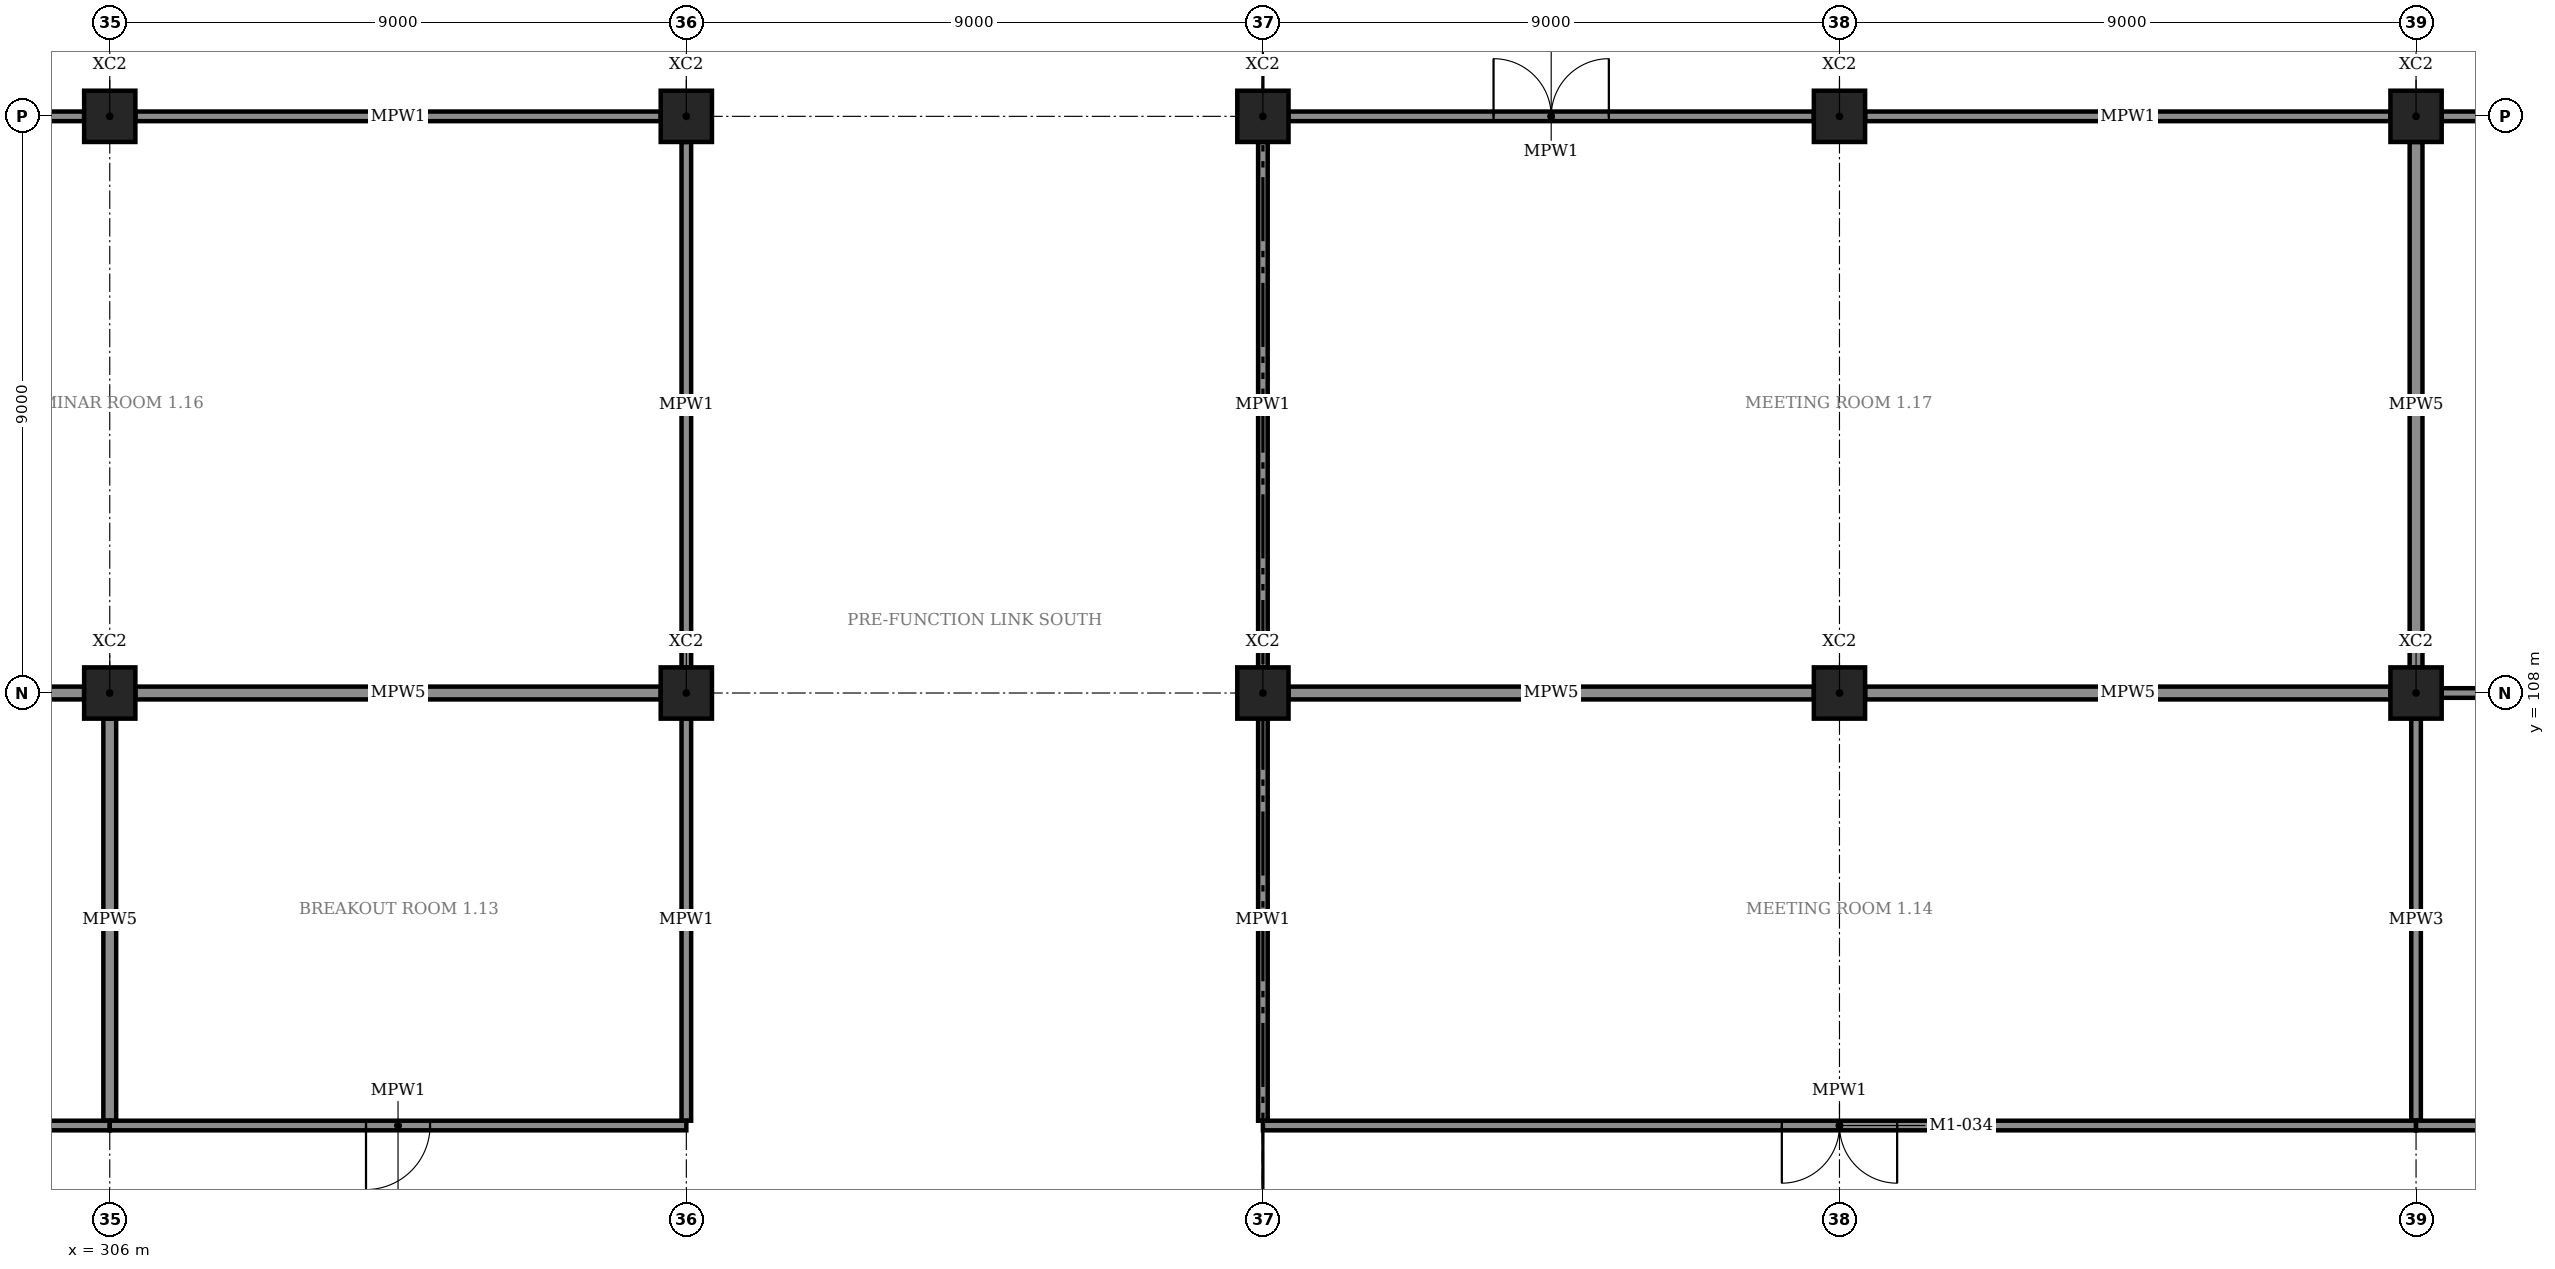
"""IFC4 building model, lengths in metres.
Left out: names, types, materials, properties, quantities, classifications, styles, units other than length and angle.
Written with IfcOpenShell. Run it as: python <this file> out.ifc"""

import sys

from ifc_helpers import new_model, si_unit, direction, frame, frame_2d, origin, origin_2d, place, context, subcontext, project, spatial, rectangle, extrude, element, fill, save


model = new_model("IFC4")
c1 = context("Model", 3, precision=1e-05, world=origin(), true_north=direction((0.0, 1.0)))
c2 = subcontext(c1, "Body", "Model", "MODEL_VIEW")
j1 = project(units=[si_unit("LENGTHUNIT", "METRE"), si_unit("PLANEANGLEUNIT", "RADIAN")], contexts=[c1])
p1 = place(None, origin())
s1 = spatial("IfcSite", under=j1, at=p1, CompositionType="ELEMENT")
p2 = place(p1, origin())
s2 = spatial("IfcBuilding", under=s1, at=p2, CompositionType="ELEMENT")
p3 = place(p2, frame((0.0, 0.0, 6.0)))
s3 = spatial("IfcBuildingStorey", under=s2, at=p3, CompositionType="ELEMENT", Elevation=6.0)
for number, where, z_axis, x_axis in (
    (1, (306.0, 108.0, 0.0), (0.0, 0.0, 1.0), (1.0, 0.0, 0.0)),
    (2, (306.0, 117.0, 0.0), (0.0, 0.0, 1.0), (1.0, 0.0, 0.0)),
    (3, (315.0, 108.0, 0.0), (0.0, 0.0, 1.0), (1.0, 0.0, 0.0)),
    (4, (315.0, 117.0, 0.0), (0.0, 0.0, 1.0), (1.0, 0.0, 0.0)),
    (5, (324.0, 108.0, 0.0), (0.0, 0.0, 1.0), (1.0, 0.0, 0.0)),
    (6, (324.0, 117.0, 0.0), (0.0, 0.0, 1.0), (1.0, 0.0, 0.0)),
    (7, (333.0, 108.0, 0.0), (0.0, 0.0, 1.0), (1.0, 0.0, 0.0)),
    (8, (333.0, 117.0, 0.0), (0.0, 0.0, 1.0), (1.0, 0.0, 0.0)),
    (9, (342.0, 108.0, 0.0), (0.0, 0.0, 1.0), (1.0, 0.0, 0.0)),
    (10, (342.0, 117.0, 0.0), (0.0, 0.0, 1.0), (1.0, 0.0, 0.0)),
):
    element("IfcColumn", number, at=place(p3, frame(where, z_axis=z_axis, x_axis=x_axis)), inside=s3, PredefinedType="COLUMN", context=c2, shape_type="SweptSolid", body=[
        extrude(rectangle(XDim=0.8, YDim=0.8, at=origin_2d()), origin(), (0.0, 0.0, 1.0), 5.5),
    ])
p4 = place(p3, frame((297.0, 101.25, 0.0), z_axis=(0.0, 0.0, 1.0), x_axis=(1.0, 0.0, 0.0)))
e11 = element("IfcWall", 11, at=p4, inside=s3, PredefinedType="PARTITIONING", context=c2, shape_type="SweptSolid", body=[
    extrude(rectangle(XDim=9.0, YDim=0.15, at=frame_2d((4.5, 0.0))), origin(), (0.0, 0.0, 1.0), 4.32),
])
p5 = place(p4, frame((4.0, 0.0, 0.0)))
e12 = element("IfcOpeningElement", 12, at=p5, cuts=e11, PredefinedType="OPENING", context=c2, shape_type="SweptSolid", body=[
    extrude(rectangle(XDim=1.0, YDim=2.4, at=frame_2d((0.5, 1.2))), frame((0.0, 0.085, 0.0), z_axis=(0.0, -1.0, 0.0), x_axis=(1.0, 0.0, 0.0)), (0.0, 0.0, 1.0), 0.17),
])
p6 = place(p3, frame((297.4, 108.0, 0.0), z_axis=(0.0, 0.0, 1.0), x_axis=(1.0, 0.0, 0.0)))
e13 = element("IfcWall", 13, at=p6, inside=s3, PredefinedType="PARTITIONING", context=c2, shape_type="SweptSolid", body=[
    extrude(rectangle(XDim=8.2, YDim=0.2, at=frame_2d((4.1, 0.0))), origin(), (0.0, 0.0, 1.0), 4.32),
])
p7 = place(p3, frame((306.0, 101.325, 0.0), z_axis=(0.0, 0.0, 1.0), x_axis=(0.0, 1.0, 0.0)))
e14 = element("IfcWall", 14, at=p7, inside=s3, PredefinedType="PARTITIONING", context=c2, shape_type="SweptSolid", body=[
    extrude(rectangle(XDim=6.275, YDim=0.2, at=frame_2d((3.138, 0.0))), origin(), (0.0, 0.0, 1.0), 4.32),
])
p8 = place(p3, frame((306.0, 101.25, 0.0), z_axis=(0.0, 0.0, 1.0), x_axis=(1.0, 0.0, 0.0)))
e15 = element("IfcWall", 15, at=p8, inside=s3, PredefinedType="PARTITIONING", context=c2, shape_type="SweptSolid", body=[
    extrude(rectangle(XDim=9.0, YDim=0.15, at=frame_2d((4.5, 0.0))), origin(), (0.0, 0.0, 1.0), 4.32),
])
p9 = place(p8, frame((4.0, 0.0, 0.0)))
e16 = element("IfcOpeningElement", 16, at=p9, cuts=e15, PredefinedType="OPENING", context=c2, shape_type="SweptSolid", body=[
    extrude(rectangle(XDim=1.0, YDim=2.4, at=frame_2d((0.5, 1.2))), frame((0.0, 0.085, 0.0), z_axis=(0.0, -1.0, 0.0), x_axis=(1.0, 0.0, 0.0)), (0.0, 0.0, 1.0), 0.17),
])
p10 = place(p3, frame((306.4, 108.0, 0.0), z_axis=(0.0, 0.0, 1.0), x_axis=(1.0, 0.0, 0.0)))
e17 = element("IfcWall", 17, at=p10, inside=s3, PredefinedType="PARTITIONING", context=c2, shape_type="SweptSolid", body=[
    extrude(rectangle(XDim=8.2, YDim=0.2, at=frame_2d((4.1, 0.0))), origin(), (0.0, 0.0, 1.0), 4.32),
])
p11 = place(p3, frame((315.0, 101.325, 0.0), z_axis=(0.0, 0.0, 1.0), x_axis=(0.0, 1.0, 0.0)))
e18 = element("IfcWall", 18, at=p11, inside=s3, PredefinedType="PARTITIONING", context=c2, shape_type="SweptSolid", body=[
    extrude(rectangle(XDim=6.275, YDim=0.15, at=frame_2d((3.138, 0.0))), origin(), (0.0, 0.0, 1.0), 4.32),
])
p12 = place(p3, frame((324.0, 101.25, 0.0), z_axis=(0.0, 0.0, 1.0), x_axis=(1.0, 0.0, 0.0)))
e19 = element("IfcWall", 19, at=p12, inside=s3, PredefinedType="PARTITIONING", context=c2, shape_type="SweptSolid", body=[
    extrude(rectangle(XDim=18.0, YDim=0.15, at=frame_2d((9.0, 0.0))), origin(), (0.0, 0.0, 1.0), 4.32),
])
p13 = place(p12, frame((8.1, 0.0, 0.0)))
e20 = element("IfcOpeningElement", 20, at=p13, cuts=e19, PredefinedType="OPENING", context=c2, shape_type="SweptSolid", body=[
    extrude(rectangle(XDim=1.8, YDim=2.4, at=frame_2d((0.9, 1.2))), frame((0.0, 0.085, 0.0), z_axis=(0.0, -1.0, 0.0), x_axis=(1.0, 0.0, 0.0)), (0.0, 0.0, 1.0), 0.17),
])
for number, where, z_axis, x_axis in (
    (21, (324.4, 108.0, 0.0), (0.0, 0.0, 1.0), (1.0, 0.0, 0.0)),
    (22, (333.4, 108.0, 0.0), (0.0, 0.0, 1.0), (1.0, 0.0, 0.0)),
):
    element("IfcWall", number, at=place(p3, frame(where, z_axis=z_axis, x_axis=x_axis)), inside=s3, PredefinedType="PARTITIONING", context=c2, shape_type="SweptSolid", body=[
        extrude(rectangle(XDim=8.2, YDim=0.2, at=frame_2d((4.1, 0.0))), origin(), (0.0, 0.0, 1.0), 4.32),
    ])
for number, where, z_axis, x_axis in (
    (23, (324.0, 101.325, 0.0), (0.0, 0.0, 1.0), (0.0, 1.0, 0.0)),
    (24, (342.0, 101.325, 0.0), (0.0, 0.0, 1.0), (0.0, 1.0, 0.0)),
):
    element("IfcWall", number, at=place(p3, frame(where, z_axis=z_axis, x_axis=x_axis)), inside=s3, PredefinedType="PARTITIONING", context=c2, shape_type="SweptSolid", body=[
        extrude(rectangle(XDim=6.275, YDim=0.15, at=frame_2d((3.138, 0.0))), origin(), (0.0, 0.0, 1.0), 4.32),
    ])
p14 = place(p3, frame((342.0, 101.25, 0.0), z_axis=(0.0, 0.0, 1.0), x_axis=(1.0, 0.0, 0.0)))
e25 = element("IfcWall", 25, at=p14, inside=s3, PredefinedType="PARTITIONING", context=c2, shape_type="SweptSolid", body=[
    extrude(rectangle(XDim=9.0, YDim=0.15, at=frame_2d((4.5, 0.0))), origin(), (0.0, 0.0, 1.0), 4.32),
])
p15 = place(p14, frame((3.9, 0.0, 0.0)))
e26 = element("IfcOpeningElement", 26, at=p15, cuts=e25, PredefinedType="OPENING", context=c2, shape_type="SweptSolid", body=[
    extrude(rectangle(XDim=1.2, YDim=2.4, at=frame_2d((0.6, 1.2))), frame((0.0, 0.085, 0.0), z_axis=(0.0, -1.0, 0.0), x_axis=(1.0, 0.0, 0.0)), (0.0, 0.0, 1.0), 0.17),
])
p16 = place(p3, frame((342.4, 108.0, 0.0), z_axis=(0.0, 0.0, 1.0), x_axis=(1.0, 0.0, 0.0)))
e27 = element("IfcWall", 27, at=p16, inside=s3, PredefinedType="PARTITIONING", context=c2, shape_type="SweptSolid", body=[
    extrude(rectangle(XDim=8.2, YDim=0.15, at=frame_2d((4.1, 0.0))), origin(), (0.0, 0.0, 1.0), 4.32),
])
p17 = place(p3, frame((297.4, 117.0, 0.0), z_axis=(0.0, 0.0, 1.0), x_axis=(1.0, 0.0, 0.0)))
e28 = element("IfcWall", 28, at=p17, inside=s3, PredefinedType="PARTITIONING", context=c2, shape_type="SweptSolid", body=[
    extrude(rectangle(XDim=8.2, YDim=0.15, at=frame_2d((4.1, 0.0))), origin(), (0.0, 0.0, 1.0), 4.32),
])
p18 = place(p17, frame((3.2, 0.0, 0.0)))
e29 = element("IfcOpeningElement", 29, at=p18, cuts=e28, PredefinedType="OPENING", context=c2, shape_type="SweptSolid", body=[
    extrude(rectangle(XDim=1.8, YDim=2.4, at=frame_2d((0.9, 1.2))), frame((0.0, 0.085, 0.0), z_axis=(0.0, -1.0, 0.0), x_axis=(1.0, 0.0, 0.0)), (0.0, 0.0, 1.0), 0.17),
])
for number, where, z_axis, x_axis in (
    (30, (306.4, 117.0, 0.0), (0.0, 0.0, 1.0), (1.0, 0.0, 0.0)),
    (31, (315.0, 108.4, 0.0), (0.0, 0.0, 1.0), (0.0, 1.0, 0.0)),
):
    element("IfcWall", number, at=place(p3, frame(where, z_axis=z_axis, x_axis=x_axis)), inside=s3, PredefinedType="PARTITIONING", context=c2, shape_type="SweptSolid", body=[
        extrude(rectangle(XDim=8.2, YDim=0.15, at=frame_2d((4.1, 0.0))), origin(), (0.0, 0.0, 1.0), 4.32),
    ])
p19 = place(p3, frame((324.4, 117.0, 0.0), z_axis=(0.0, 0.0, 1.0), x_axis=(1.0, 0.0, 0.0)))
e32 = element("IfcWall", 32, at=p19, inside=s3, PredefinedType="PARTITIONING", context=c2, shape_type="SweptSolid", body=[
    extrude(rectangle(XDim=8.2, YDim=0.15, at=frame_2d((4.1, 0.0))), origin(), (0.0, 0.0, 1.0), 4.32),
])
p20 = place(p19, frame((3.2, 0.0, 0.0)))
e33 = element("IfcOpeningElement", 33, at=p20, cuts=e32, PredefinedType="OPENING", context=c2, shape_type="SweptSolid", body=[
    extrude(rectangle(XDim=1.8, YDim=2.4, at=frame_2d((0.9, 1.2))), frame((0.0, 0.085, 0.0), z_axis=(0.0, -1.0, 0.0), x_axis=(1.0, 0.0, 0.0)), (0.0, 0.0, 1.0), 0.17),
])
for number, where, z_axis, x_axis in (
    (34, (333.4, 117.0, 0.0), (0.0, 0.0, 1.0), (1.0, 0.0, 0.0)),
    (35, (324.0, 108.4, 0.0), (0.0, 0.0, 1.0), (0.0, 1.0, 0.0)),
):
    element("IfcWall", number, at=place(p3, frame(where, z_axis=z_axis, x_axis=x_axis)), inside=s3, PredefinedType="PARTITIONING", context=c2, shape_type="SweptSolid", body=[
        extrude(rectangle(XDim=8.2, YDim=0.15, at=frame_2d((4.1, 0.0))), origin(), (0.0, 0.0, 1.0), 4.32),
    ])
p21 = place(p3, frame((342.0, 108.4, 0.0), z_axis=(0.0, 0.0, 1.0), x_axis=(0.0, 1.0, 0.0)))
e36 = element("IfcWall", 36, at=p21, inside=s3, PredefinedType="PARTITIONING", context=c2, shape_type="SweptSolid", body=[
    extrude(rectangle(XDim=8.2, YDim=0.2, at=frame_2d((4.1, 0.0))), origin(), (0.0, 0.0, 1.0), 4.32),
])
p22 = place(p3, frame((342.4, 117.0, 0.0), z_axis=(0.0, 0.0, 1.0), x_axis=(1.0, 0.0, 0.0)))
e37 = element("IfcWall", 37, at=p22, inside=s3, PredefinedType="PARTITIONING", context=c2, shape_type="SweptSolid", body=[
    extrude(rectangle(XDim=8.2, YDim=0.15, at=frame_2d((4.1, 0.0))), origin(), (0.0, 0.0, 1.0), 4.32),
])
p23 = place(p22, frame((3.6, 0.0, 0.0)))
e38 = element("IfcOpeningElement", 38, at=p23, cuts=e37, PredefinedType="OPENING", context=c2, shape_type="SweptSolid", body=[
    extrude(rectangle(XDim=1.0, YDim=2.4, at=frame_2d((0.5, 1.2))), frame((0.0, 0.085, 0.0), z_axis=(0.0, -1.0, 0.0), x_axis=(1.0, 0.0, 0.0)), (0.0, 0.0, 1.0), 0.17),
])
p24 = place(p9, frame((1.0, 0.0, 0.0), z_axis=(0.0, 0.0, 1.0), x_axis=(-1.0, 0.0, 0.0)))
e39 = element("IfcDoor", 39, at=p24, inside=s3, OperationType="SINGLE_SWING_LEFT", PredefinedType="DOOR", context=c2, shape_type="SweptSolid", body=[
    extrude(rectangle(XDim=1.0, YDim=2.4, at=frame_2d((0.5, 1.2))), frame((0.0, 0.025, 0.0), z_axis=(0.0, -1.0, 0.0), x_axis=(1.0, 0.0, 0.0)), (0.0, 0.0, 1.0), 0.05),
])
fill(e16, e39)
p25 = place(p13, frame((1.8, 0.0, 0.0), z_axis=(0.0, 0.0, 1.0), x_axis=(-1.0, 0.0, 0.0)))
e40 = element("IfcDoor", 40, at=p25, inside=s3, OperationType="DOUBLE_DOOR_SINGLE_SWING", PredefinedType="DOOR", context=c2, shape_type="SweptSolid", body=[
    extrude(rectangle(XDim=1.8, YDim=2.4, at=frame_2d((0.9, 1.2))), frame((0.0, 0.025, 0.0), z_axis=(0.0, -1.0, 0.0), x_axis=(1.0, 0.0, 0.0)), (0.0, 0.0, 1.0), 0.05),
])
fill(e20, e40)
p26 = place(p20, origin())
e41 = element("IfcDoor", 41, at=p26, inside=s3, OperationType="DOUBLE_DOOR_SINGLE_SWING", PredefinedType="DOOR", context=c2, shape_type="SweptSolid", body=[
    extrude(rectangle(XDim=1.8, YDim=2.4, at=frame_2d((0.9, 1.2))), frame((0.0, 0.025, 0.0), z_axis=(0.0, -1.0, 0.0), x_axis=(1.0, 0.0, 0.0)), (0.0, 0.0, 1.0), 0.05),
])
fill(e33, e41)
save(model, sys.argv[1])
